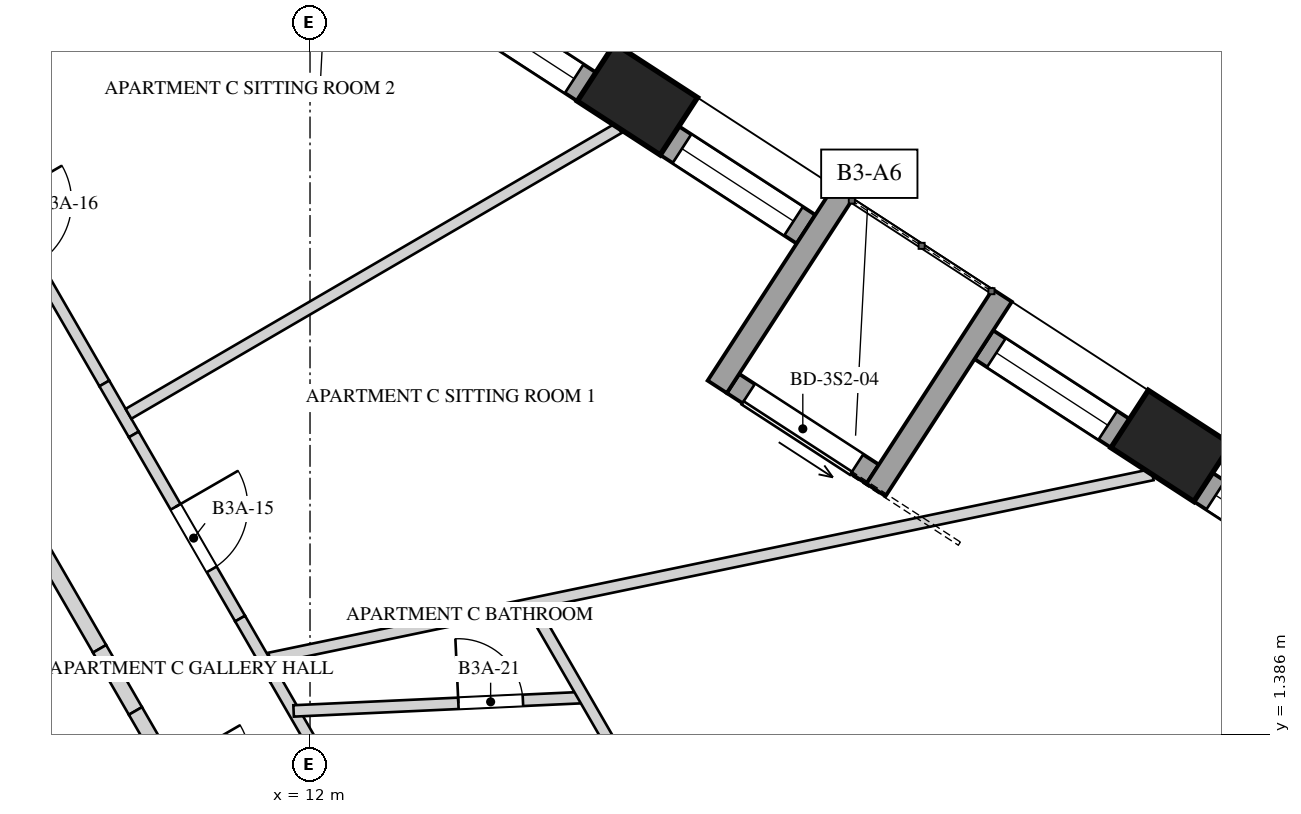
"""IFC4 building model, lengths in metres.
Left out: names, types, materials, properties, quantities, classifications, styles, units other than length and angle.
Written with IfcOpenShell. Run it as: python <this file> out.ifc"""

import sys

from ifc_helpers import new_model, si_unit, direction, frame, frame_2d, origin, origin_2d, place, context, subcontext, project, spatial, rectangle, extrude, element, fill, save


model = new_model("IFC4")
c1 = context("Model", 3, precision=1e-05, world=origin(), true_north=direction((0.0, 1.0)))
c2 = subcontext(c1, "Body", "Model", "MODEL_VIEW")
j1 = project(units=[si_unit("LENGTHUNIT", "METRE"), si_unit("PLANEANGLEUNIT", "RADIAN")], contexts=[c1])
p1 = place(None, origin())
s1 = spatial("IfcSite", under=j1, at=p1, CompositionType="ELEMENT")
p2 = place(p1, origin())
s2 = spatial("IfcBuilding", under=s1, at=p2, CompositionType="ELEMENT")
p3 = place(p2, frame((0.0, 0.0, 129.6)))
s3 = spatial("IfcBuildingStorey", under=s2, at=p3, CompositionType="ELEMENT", Elevation=129.6)
p4 = place(p3, frame((9.729, -4.25, 0.0), z_axis=(0.0, 0.0, 1.0), x_axis=(-0.500004814304, 0.866022624227, 0.0)))
e1 = element("IfcWall", 1, at=p4, inside=s3, PredefinedType="SHEAR", context=c2, shape_type="SweptSolid", body=[
    extrude(rectangle(XDim=17.09, YDim=0.9, at=frame_2d((8.545, 0.0))), origin(), (0.0, 0.0, 1.0), 4.0),
])
p5 = place(p4, frame((6.82, 0.0, 0.0)))
e2 = element("IfcOpeningElement", 2, at=p5, cuts=e1, PredefinedType="OPENING", context=c2, shape_type="SweptSolid", body=[
    extrude(rectangle(XDim=1.0, YDim=2.4, at=frame_2d((0.5, 1.2))), frame((0.0, 0.46, 0.0), z_axis=(0.0, -1.0, 0.0), x_axis=(1.0, 0.0, 0.0)), (0.0, 0.0, 1.0), 0.92),
])
for number, where, z_axis, x_axis in (
    (3, (23.328, 5.18, 0.0), (0.0, 0.0, 1.0), (-0.839, 0.545, 0.0)),
    (4, (16.307, 9.74, 0.0), (0.0, 0.0, 1.0), (-0.839, 0.545, 0.0)),
):
    element("IfcColumn", number, at=place(p3, frame(where, z_axis=z_axis, x_axis=x_axis)), inside=s3, PredefinedType="COLUMN", context=c2, shape_type="SweptSolid", body=[
        extrude(rectangle(XDim=1.3, YDim=0.9, at=origin_2d()), origin(), (0.0, 0.0, 1.0), 4.0),
    ])
p6 = place(p3, frame((25.546, 3.472, 0.0), z_axis=(0.0, 0.0, 1.0), x_axis=(-0.838675466927, 0.544631491171, 0.0)))
e5 = element("IfcWall", 5, at=p6, inside=s3, PredefinedType="SOLIDWALL", context=c2, shape_type="SweptSolid", body=[
    extrude(rectangle(XDim=2.14, YDim=0.45, at=frame_2d((1.07, 0.0))), origin(), (0.0, 0.0, 1.0), 3.3),
])
p7 = place(p6, frame((0.195, 0.0, 0.5)))
e6 = element("IfcOpeningElement", 6, at=p7, cuts=e5, PredefinedType="OPENING", context=c2, shape_type="SweptSolid", body=[
    extrude(rectangle(XDim=1.75, YDim=2.65, at=frame_2d((0.875, 1.325))), frame((0.0, 0.235, 0.0), z_axis=(0.0, -1.0, 0.0), x_axis=(1.0, 0.0, 0.0)), (0.0, 0.0, 1.0), 0.47),
])
p8 = place(p3, frame((22.66, 5.346, 0.0), z_axis=(0.0, 0.0, 1.0), x_axis=(-0.838675466927, 0.544631491171, 0.0)))
e7 = element("IfcWall", 7, at=p8, inside=s3, PredefinedType="SOLIDWALL", context=c2, shape_type="SweptSolid", body=[
    extrude(rectangle(XDim=2.14, YDim=0.45, at=frame_2d((1.07, 0.0))), origin(), (0.0, 0.0, 1.0), 3.3),
])
p9 = place(p8, frame((0.195, 0.0, 0.5)))
e8 = element("IfcOpeningElement", 8, at=p9, cuts=e7, PredefinedType="OPENING", context=c2, shape_type="SweptSolid", body=[
    extrude(rectangle(XDim=1.75, YDim=2.0, at=frame_2d((0.875, 1.0))), frame((0.0, 0.235, 0.0), z_axis=(0.0, -1.0, 0.0), x_axis=(1.0, 0.0, 0.0)), (0.0, 0.0, 1.0), 0.47),
])
p10 = place(p3, frame((18.525, 8.031, 0.0), z_axis=(0.0, 0.0, 1.0), x_axis=(-0.838675466927, 0.544631491171, 0.0)))
e9 = element("IfcWall", 9, at=p10, inside=s3, PredefinedType="SOLIDWALL", context=c2, shape_type="SweptSolid", body=[
    extrude(rectangle(XDim=2.14, YDim=0.45, at=frame_2d((1.07, 0.0))), origin(), (0.0, 0.0, 1.0), 3.3),
])
p11 = place(p10, frame((0.195, 0.0, 0.5)))
e10 = element("IfcOpeningElement", 10, at=p11, cuts=e9, PredefinedType="OPENING", context=c2, shape_type="SweptSolid", body=[
    extrude(rectangle(XDim=1.75, YDim=2.65, at=frame_2d((0.875, 1.325))), frame((0.0, 0.235, 0.0), z_axis=(0.0, -1.0, 0.0), x_axis=(1.0, 0.0, 0.0)), (0.0, 0.0, 1.0), 0.47),
])
p12 = place(p3, frame((15.639, 9.905, 0.0), z_axis=(0.0, 0.0, 1.0), x_axis=(-0.838677021821, 0.54462909679, 0.0)))
e11 = element("IfcWall", 11, at=p12, inside=s3, PredefinedType="SOLIDWALL", context=c2, shape_type="SweptSolid", body=[
    extrude(rectangle(XDim=7.072, YDim=0.45, at=frame_2d((3.536, 0.0))), origin(), (0.0, 0.0, 1.0), 3.3),
])
p13 = place(p12, frame((0.195, 0.0, 0.5)))
e12 = element("IfcOpeningElement", 12, at=p13, cuts=e11, PredefinedType="OPENING", context=c2, shape_type="SweptSolid", body=[
    extrude(rectangle(XDim=1.75, YDim=2.65, at=frame_2d((0.875, 1.325))), frame((0.0, 0.235, 0.0), z_axis=(0.0, -1.0, 0.0), x_axis=(1.0, 0.0, 0.0)), (0.0, 0.0, 1.0), 0.47),
])
p14 = place(p12, frame((2.661, 0.0, 0.5)))
e13 = element("IfcOpeningElement", 13, at=p14, cuts=e11, PredefinedType="OPENING", context=c2, shape_type="SweptSolid", body=[
    extrude(rectangle(XDim=1.75, YDim=2.65, at=frame_2d((0.875, 1.325))), frame((0.0, 0.235, 0.0), z_axis=(0.0, -1.0, 0.0), x_axis=(1.0, 0.0, 0.0)), (0.0, 0.0, 1.0), 0.47),
])
p15 = place(p12, frame((5.126, 0.0, 0.5)))
e14 = element("IfcOpeningElement", 14, at=p15, cuts=e11, PredefinedType="OPENING", context=c2, shape_type="SweptSolid", body=[
    extrude(rectangle(XDim=1.75, YDim=2.65, at=frame_2d((0.875, 1.325))), frame((0.0, 0.235, 0.0), z_axis=(0.0, -1.0, 0.0), x_axis=(1.0, 0.0, 0.0)), (0.0, 0.0, 1.0), 0.47),
])
p16 = place(p3, frame((19.402, 4.809, 0.0), z_axis=(0.0, 0.0, 1.0), x_axis=(-0.838659986147, 0.544655329209, 0.0)))
e15 = element("IfcWall", 15, at=p16, inside=s3, PredefinedType="SOLIDWALL", context=c2, shape_type="SweptSolid", body=[
    extrude(rectangle(XDim=2.191, YDim=0.3, at=frame_2d((1.095, 0.0))), origin(), (0.0, 0.0, 1.0), 3.3),
])
p17 = place(p16, frame((0.245, 0.0, 0.0)))
e16 = element("IfcOpeningElement", 16, at=p17, cuts=e15, PredefinedType="OPENING", context=c2, shape_type="SweptSolid", body=[
    extrude(rectangle(XDim=1.7, YDim=2.45, at=frame_2d((0.85, 1.225))), frame((0.0, 0.16, 0.0), z_axis=(0.0, -1.0, 0.0), x_axis=(1.0, 0.0, 0.0)), (0.0, 0.0, 1.0), 0.32),
])
for number, where, z_axis, x_axis in (
    (17, (21.107, 7.159, 0.0), (0.0, 0.0, 1.0), (-0.545, -0.839, 0.0)),
    (18, (19.018, 8.516, 0.0), (0.0, 0.0, 1.0), (-0.545, -0.839, 0.0)),
):
    element("IfcWall", number, at=place(p3, frame(where, z_axis=z_axis, x_axis=x_axis)), inside=s3, PredefinedType="SOLIDWALL", context=c2, shape_type="SweptSolid", body=[
        extrude(rectangle(XDim=3.05, YDim=0.3, at=frame_2d((1.525, 0.0))), origin(), (0.0, 0.0, 1.0), 3.3),
    ])
p18 = place(p3, frame((6.944, 10.073, 0.0), z_axis=(0.0, 0.0, 1.0), x_axis=(0.499993726502, -0.86602902576, 0.0)))
e19 = element("IfcWall", 19, at=p18, inside=s3, PredefinedType="PARTITIONING", context=c2, shape_type="SweptSolid", body=[
    extrude(rectangle(XDim=4.7, YDim=0.15, at=frame_2d((2.35, 0.0))), origin(), (0.0, 0.0, 1.0), 3.65),
])
p19 = place(p18, frame((1.94, 0.0, 0.0)))
e20 = element("IfcOpeningElement", 20, at=p19, cuts=e19, PredefinedType="OPENING", context=c2, shape_type="SweptSolid", body=[
    extrude(rectangle(XDim=0.95, YDim=2.4, at=frame_2d((0.475, 1.2))), frame((0.0, 0.085, 0.0), z_axis=(0.0, -1.0, 0.0), x_axis=(1.0, 0.0, 0.0)), (0.0, 0.0, 1.0), 0.17),
])
p20 = place(p3, frame((9.294, 6.002, 0.0), z_axis=(0.0, 0.0, 1.0), x_axis=(0.499831512295, -0.866122658356, 0.0)))
e21 = element("IfcWall", 21, at=p20, inside=s3, PredefinedType="PARTITIONING", context=c2, shape_type="SweptSolid", body=[
    extrude(rectangle(XDim=0.775, YDim=0.15, at=frame_2d((0.388, 0.0))), origin(), (0.0, 0.0, 1.0), 2.75),
])
p21 = place(p3, frame((9.681, 5.331, 0.0), z_axis=(0.0, 0.0, 1.0), x_axis=(0.500034735108, -0.866005348532, 0.0)))
e22 = element("IfcWall", 22, at=p21, inside=s3, PredefinedType="PARTITIONING", context=c2, shape_type="SweptSolid", body=[
    extrude(rectangle(XDim=2.797, YDim=0.15, at=frame_2d((1.398, 0.0))), origin(), (0.0, 0.0, 1.0), 3.65),
])
p22 = place(p21, frame((1.1, 0.0, 0.0)))
e23 = element("IfcOpeningElement", 23, at=p22, cuts=e22, PredefinedType="OPENING", context=c2, shape_type="SweptSolid", body=[
    extrude(rectangle(XDim=0.95, YDim=2.4, at=frame_2d((0.475, 1.2))), frame((0.0, 0.085, 0.0), z_axis=(0.0, -1.0, 0.0), x_axis=(1.0, 0.0, 0.0)), (0.0, 0.0, 1.0), 0.17),
])
p23 = place(p3, frame((11.08, 2.909, 0.0), z_axis=(0.0, 0.0, 1.0), x_axis=(0.500060322201, -0.865990573944, 0.0)))
e24 = element("IfcWall", 24, at=p23, inside=s3, PredefinedType="PARTITIONING", context=c2, shape_type="SweptSolid", body=[
    extrude(rectangle(XDim=0.917, YDim=0.15, at=frame_2d((0.459, 0.0))), origin(), (0.0, 0.0, 1.0), 2.55),
])
p24 = place(p3, frame((11.539, 2.114, 0.0), z_axis=(0.0, 0.0, 1.0), x_axis=(0.499986163319, -0.866033392248, 0.0)))
e25 = element("IfcWall", 25, at=p24, inside=s3, PredefinedType="PARTITIONING", context=c2, shape_type="SweptSolid", body=[
    extrude(rectangle(XDim=1.549, YDim=0.15, at=frame_2d((0.775, 0.0))), origin(), (0.0, 0.0, 1.0), 3.65),
])
p25 = place(p3, frame((9.041, 13.922, 0.0), z_axis=(0.0, 0.0, 1.0), x_axis=(-0.544639775338, -0.838670087174, 0.0)))
e26 = element("IfcWall", 26, at=p25, inside=s3, PredefinedType="SOLIDWALL", context=c2, shape_type="SweptSolid", body=[
    extrude(rectangle(XDim=6.106, YDim=0.25, at=frame_2d((3.053, 0.0))), origin(), (0.0, 0.0, 1.0), 2.95),
])
p26 = place(p3, frame((9.612, 5.603, 0.0), z_axis=(0.0, 0.0, 1.0), x_axis=(0.863953189991, 0.503572125425, 0.0)))
e27 = element("IfcWall", 27, at=p26, inside=s3, PredefinedType="PARTITIONING", context=c2, shape_type="SweptSolid", body=[
    extrude(rectangle(XDim=7.466, YDim=0.15, at=frame_2d((3.733, 0.0))), origin(), (0.0, 0.0, 1.0), 2.75),
])
p27 = place(p3, frame((11.468, 2.386, 0.0), z_axis=(0.0, 0.0, 1.0), x_axis=(0.979030724859, 0.203712640211, 0.0)))
e28 = element("IfcWall", 28, at=p27, inside=s3, PredefinedType="PARTITIONING", context=c2, shape_type="SweptSolid", body=[
    extrude(rectangle(XDim=11.864, YDim=0.15, at=frame_2d((5.932, 0.0))), origin(), (0.0, 0.0, 1.0), 2.55),
])
p28 = place(p3, frame((11.784, 1.694, 0.0), z_axis=(0.0, 0.0, 1.0), x_axis=(0.998933757579, 0.046166524337, 0.0)))
e29 = element("IfcWall", 29, at=p28, inside=s3, PredefinedType="PARTITIONING", context=c2, shape_type="SweptSolid", body=[
    extrude(rectangle(XDim=3.823, YDim=0.15, at=frame_2d((1.912, 0.0))), origin(), (0.0, 0.0, 1.0), 3.65),
])
p29 = place(p28, frame((2.17, 0.0, 0.0)))
e30 = element("IfcOpeningElement", 30, at=p29, cuts=e29, PredefinedType="OPENING", context=c2, shape_type="SweptSolid", body=[
    extrude(rectangle(XDim=0.85, YDim=2.4, at=frame_2d((0.425, 1.2))), frame((0.0, 0.085, 0.0), z_axis=(0.0, -1.0, 0.0), x_axis=(1.0, 0.0, 0.0)), (0.0, 0.0, 1.0), 0.17),
])
p30 = place(p3, frame((14.936, 3.031, 0.0), z_axis=(0.0, 0.0, 1.0), x_axis=(0.499298623879, -0.866429964967, 0.0)))
e31 = element("IfcWall", 31, at=p30, inside=s3, PredefinedType="PARTITIONING", context=c2, shape_type="SweptSolid", body=[
    extrude(rectangle(XDim=0.166, YDim=0.15, at=frame_2d((0.083, 0.0))), origin(), (0.0, 0.0, 1.0), 2.55),
])
p31 = place(p3, frame((15.019, 2.887, 0.0), z_axis=(0.0, 0.0, 1.0), x_axis=(0.50006548692, -0.865987591592, 0.0)))
e32 = element("IfcWall", 32, at=p31, inside=s3, PredefinedType="PARTITIONING", context=c2, shape_type="SweptSolid", body=[
    extrude(rectangle(XDim=2.321, YDim=0.15, at=frame_2d((1.16, 0.0))), origin(), (0.0, 0.0, 1.0), 3.65),
])
p32 = place(p3, frame((8.142, 4.397, 0.0), z_axis=(0.0, 0.0, 1.0), x_axis=(0.499948868167, -0.866054922749, 0.0)))
e33 = element("IfcWall", 33, at=p32, inside=s3, PredefinedType="SOLIDWALL", context=c2, shape_type="SweptSolid", body=[
    extrude(rectangle(XDim=2.178, YDim=0.2, at=frame_2d((1.089, 0.0))), origin(), (0.0, 0.0, 1.0), 3.65),
])
p33 = place(p3, frame((9.231, 2.511, 0.0), z_axis=(0.0, 0.0, 1.0), x_axis=(0.500118100521, -0.865957207679, 0.0)))
e34 = element("IfcWall", 34, at=p33, inside=s3, PredefinedType="SOLIDWALL", context=c2, shape_type="SweptSolid", body=[
    extrude(rectangle(XDim=0.944, YDim=0.2, at=frame_2d((0.472, 0.0))), origin(), (0.0, 0.0, 1.0), 2.55),
])
p34 = place(p3, frame((9.703, 1.694, 0.0), z_axis=(0.0, 0.0, 1.0), x_axis=(0.499942357345, -0.866058681229, 0.0)))
e35 = element("IfcWall", 35, at=p34, inside=s3, PredefinedType="SOLIDWALL", context=c2, shape_type="SweptSolid", body=[
    extrude(rectangle(XDim=0.801, YDim=0.2, at=frame_2d((0.4, 0.0))), origin(), (0.0, 0.0, 1.0), 3.65),
])
p35 = place(p7, origin())
e36 = element("IfcWindow", 36, at=p35, inside=s3, PartitioningType="SINGLE_PANEL", PredefinedType="WINDOW", context=c2, shape_type="SweptSolid", body=[
    extrude(rectangle(XDim=1.75, YDim=2.65, at=frame_2d((0.875, 1.325))), frame((0.0, 0.03, 0.0), z_axis=(0.0, -1.0, 0.0), x_axis=(1.0, 0.0, 0.0)), (0.0, 0.0, 1.0), 0.06),
])
fill(e6, e36)
p36 = place(p9, origin())
e37 = element("IfcWindow", 37, at=p36, inside=s3, PartitioningType="SINGLE_PANEL", PredefinedType="WINDOW", context=c2, shape_type="SweptSolid", body=[
    extrude(rectangle(XDim=1.75, YDim=2.0, at=frame_2d((0.875, 1.0))), frame((0.0, 0.03, 0.0), z_axis=(0.0, -1.0, 0.0), x_axis=(1.0, 0.0, 0.0)), (0.0, 0.0, 1.0), 0.06),
])
fill(e8, e37)
p37 = place(p11, origin())
e38 = element("IfcWindow", 38, at=p37, inside=s3, PartitioningType="SINGLE_PANEL", PredefinedType="WINDOW", context=c2, shape_type="SweptSolid", body=[
    extrude(rectangle(XDim=1.75, YDim=2.65, at=frame_2d((0.875, 1.325))), frame((0.0, 0.03, 0.0), z_axis=(0.0, -1.0, 0.0), x_axis=(1.0, 0.0, 0.0)), (0.0, 0.0, 1.0), 0.06),
])
fill(e10, e38)
p38 = place(p13, origin())
e39 = element("IfcWindow", 39, at=p38, inside=s3, PartitioningType="SINGLE_PANEL", PredefinedType="WINDOW", context=c2, shape_type="SweptSolid", body=[
    extrude(rectangle(XDim=1.75, YDim=2.65, at=frame_2d((0.875, 1.325))), frame((0.0, 0.03, 0.0), z_axis=(0.0, -1.0, 0.0), x_axis=(1.0, 0.0, 0.0)), (0.0, 0.0, 1.0), 0.06),
])
fill(e12, e39)
p39 = place(p17, origin())
e40 = element("IfcDoor", 40, at=p39, inside=s3, OperationType="SLIDING_TO_LEFT", PredefinedType="DOOR", context=c2, shape_type="SweptSolid", body=[
    extrude(rectangle(XDim=1.7, YDim=2.45, at=frame_2d((0.85, 1.225))), frame((0.0, 0.025, 0.0), z_axis=(0.0, -1.0, 0.0), x_axis=(1.0, 0.0, 0.0)), (0.0, 0.0, 1.0), 0.05),
])
fill(e16, e40)
p40 = place(p22, origin())
e41 = element("IfcDoor", 41, at=p40, inside=s3, OperationType="SINGLE_SWING_LEFT", PredefinedType="DOOR", context=c2, shape_type="SweptSolid", body=[
    extrude(rectangle(XDim=0.95, YDim=2.4, at=frame_2d((0.475, 1.2))), frame((0.0, 0.025, 0.0), z_axis=(0.0, -1.0, 0.0), x_axis=(1.0, 0.0, 0.0)), (0.0, 0.0, 1.0), 0.05),
])
fill(e23, e41)
p41 = place(p29, origin())
e42 = element("IfcDoor", 42, at=p41, inside=s3, OperationType="SINGLE_SWING_LEFT", PredefinedType="DOOR", context=c2, shape_type="SweptSolid", body=[
    extrude(rectangle(XDim=0.85, YDim=2.4, at=frame_2d((0.425, 1.2))), frame((0.0, 0.025, 0.0), z_axis=(0.0, -1.0, 0.0), x_axis=(1.0, 0.0, 0.0)), (0.0, 0.0, 1.0), 0.05),
])
fill(e30, e42)
save(model, sys.argv[1])
